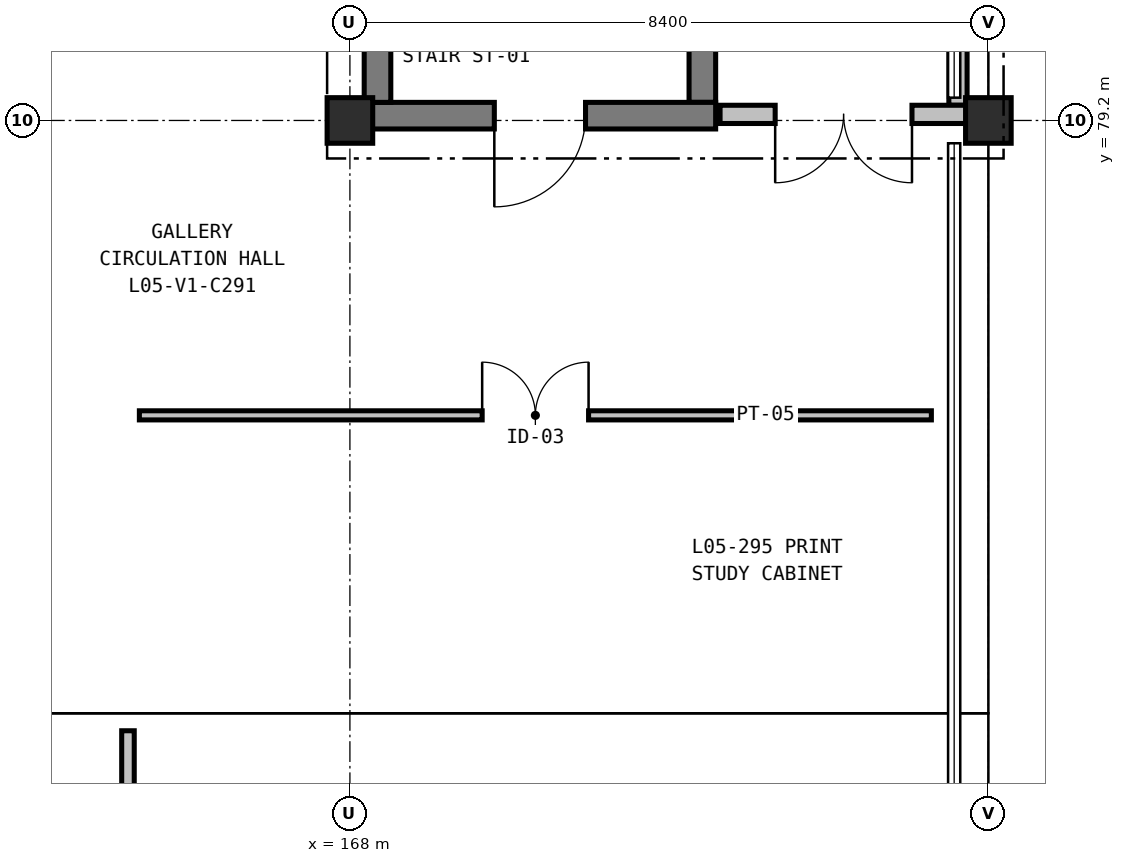
"""IFC4 building model, lengths in metres.
Left out: names, types, materials, properties, quantities, classifications, styles, units other than length and angle.
Written with IfcOpenShell. Run it as: python <this file> out.ifc"""

import sys

from ifc_helpers import new_model, si_unit, direction, frame, frame_2d, origin, origin_2d, place, context, subcontext, project, spatial, rectangle, extrude, element, fill, save


model = new_model("IFC4")
c1 = context("Model", 3, precision=1e-05, world=origin(), true_north=direction((0.0, 1.0)))
c2 = subcontext(c1, "Body", "Model", "MODEL_VIEW")
j1 = project(units=[si_unit("LENGTHUNIT", "METRE"), si_unit("PLANEANGLEUNIT", "RADIAN")], contexts=[c1])
p1 = place(None, origin())
s1 = spatial("IfcSite", under=j1, at=p1, CompositionType="ELEMENT")
p2 = place(p1, origin())
s2 = spatial("IfcBuilding", under=s1, at=p2, CompositionType="ELEMENT")
p3 = place(p2, frame((0.0, 0.0, 27.0)))
s3 = spatial("IfcBuildingStorey", under=s2, at=p3, CompositionType="ELEMENT", Elevation=27.0)
for number, where, z_axis, x_axis in (
    (1, (168.0, 79.2, 0.0), (0.0, 0.0, 1.0), (1.0, 0.0, 0.0)),
    (2, (176.4, 79.2, 0.0), (0.0, 0.0, 1.0), (1.0, 0.0, 0.0)),
):
    element("IfcColumn", number, at=place(p3, frame(where, z_axis=z_axis, x_axis=x_axis)), inside=s3, PredefinedType="COLUMN", context=c2, shape_type="SweptSolid", body=[
        extrude(rectangle(XDim=0.6, YDim=0.6, at=origin_2d()), origin(), (0.0, 0.0, 1.0), 5.4),
    ])
p4 = place(p3, frame((172.637, 88.562, 0.0), z_axis=(0.0, 0.0, 1.0), x_axis=(0.0, -1.0, 0.0)))
e3 = element("IfcWall", 3, at=p4, inside=s3, PredefinedType="SHEAR", context=c2, shape_type="SweptSolid", body=[
    extrude(rectangle(XDim=9.124, YDim=0.35, at=frame_2d((4.562, 0.0))), origin(), (0.0, 0.0, 1.0), 5.1),
])
p5 = place(p3, frame((172.812, 79.263, 0.0), z_axis=(0.0, 0.0, 1.0), x_axis=(-1.0, 0.0, 0.0)))
e4 = element("IfcWall", 4, at=p5, inside=s3, PredefinedType="SHEAR", context=c2, shape_type="SweptSolid", body=[
    extrude(rectangle(XDim=4.624, YDim=0.35, at=frame_2d((2.312, 0.0))), origin(), (0.0, 0.0, 1.0), 5.1),
])
p6 = place(p5, frame((1.712, 0.0, 0.0)))
e5 = element("IfcOpeningElement", 5, at=p6, cuts=e4, PredefinedType="OPENING", context=c2, shape_type="SweptSolid", body=[
    extrude(rectangle(XDim=1.2, YDim=2.2, at=frame_2d((0.6, 1.1))), frame((0.0, 0.185, 0.0), z_axis=(0.0, -1.0, 0.0), x_axis=(1.0, 0.0, 0.0)), (0.0, 0.0, 1.0), 0.37),
])
p7 = place(p3, frame((168.363, 79.438, 0.0), z_axis=(0.0, 0.0, 1.0), x_axis=(0.0, 1.0, 0.0)))
e6 = element("IfcWall", 6, at=p7, inside=s3, PredefinedType="SHEAR", context=c2, shape_type="SweptSolid", body=[
    extrude(rectangle(XDim=9.124, YDim=0.35, at=frame_2d((4.562, 0.0))), origin(), (0.0, 0.0, 1.0), 5.1),
])
p8 = place(p3, frame((176.0, 84.9, 0.0), z_axis=(0.0, 0.0, 1.0), x_axis=(0.0, -1.0, 0.0)))
e7 = element("IfcWall", 7, at=p8, inside=s3, PredefinedType="PARTITIONING", context=c2, shape_type="SweptSolid", body=[
    extrude(rectangle(XDim=5.5, YDim=0.24, at=frame_2d((2.75, 0.0))), origin(), (0.0, 0.0, 1.0), 4.465),
])
p9 = place(p3, frame((176.12, 79.28, 0.0), z_axis=(0.0, 0.0, 1.0), x_axis=(-1.0, 0.0, 0.0)))
e8 = element("IfcWall", 8, at=p9, inside=s3, PredefinedType="PARTITIONING", context=c2, shape_type="SweptSolid", body=[
    extrude(rectangle(XDim=3.25, YDim=0.24, at=frame_2d((1.625, 0.0))), origin(), (0.0, 0.0, 1.0), 4.465),
])
p10 = place(p9, frame((0.725, 0.0, 0.0)))
e9 = element("IfcOpeningElement", 9, at=p10, cuts=e8, PredefinedType="OPENING", context=c2, shape_type="SweptSolid", body=[
    extrude(rectangle(XDim=1.8, YDim=2.25, at=frame_2d((0.9, 1.125))), frame((0.0, 0.13, 0.0), z_axis=(0.0, -1.0, 0.0), x_axis=(1.0, 0.0, 0.0)), (0.0, 0.0, 1.0), 0.26),
])
p11 = place(p3, frame((165.08, 58.73, 0.0), z_axis=(0.0, 0.0, 1.0), x_axis=(0.0, 1.0, 0.0)))
e10 = element("IfcWall", 10, at=p11, inside=s3, PredefinedType="PARTITIONING", context=c2, shape_type="SweptSolid", body=[
    extrude(rectangle(XDim=12.44, YDim=0.165, at=frame_2d((6.22, 0.0))), origin(), (0.0, 0.0, 1.0), 4.465),
])
p12 = place(p11, frame((5.32, 0.0, 0.0)))
e11 = element("IfcOpeningElement", 11, at=p12, cuts=e10, PredefinedType="OPENING", context=c2, shape_type="SweptSolid", body=[
    extrude(rectangle(XDim=1.8, YDim=2.4, at=frame_2d((0.9, 1.2))), frame((0.0, 0.093, 0.0), z_axis=(0.0, -1.0, 0.0), x_axis=(1.0, 0.0, 0.0)), (0.0, 0.0, 1.0), 0.185),
])
p13 = place(p3, frame((165.23, 75.32, 0.0), z_axis=(0.0, 0.0, 1.0), x_axis=(1.0, 0.0, 0.0)))
e12 = element("IfcWall", 12, at=p13, inside=s3, PredefinedType="PARTITIONING", context=c2, shape_type="SweptSolid", body=[
    extrude(rectangle(XDim=10.42, YDim=0.12, at=frame_2d((5.21, 0.0))), origin(), (0.0, 0.0, 1.0), 4.315),
])
p14 = place(p13, frame((4.51, 0.0, 0.0)))
e13 = element("IfcOpeningElement", 13, at=p14, cuts=e12, PredefinedType="OPENING", context=c2, shape_type="SweptSolid", body=[
    extrude(rectangle(XDim=1.4, YDim=2.3, at=frame_2d((0.7, 1.15))), frame((0.0, 0.07, 0.0), z_axis=(0.0, -1.0, 0.0), x_axis=(1.0, 0.0, 0.0)), (0.0, 0.0, 1.0), 0.14),
])
p15 = place(p6, origin())
e14 = element("IfcDoor", 14, at=p15, inside=s3, OperationType="SINGLE_SWING_RIGHT", PredefinedType="DOOR", context=c2, shape_type="SweptSolid", body=[
    extrude(rectangle(XDim=1.2, YDim=2.2, at=frame_2d((0.6, 1.1))), frame((0.0, 0.025, 0.0), z_axis=(0.0, -1.0, 0.0), x_axis=(1.0, 0.0, 0.0)), (0.0, 0.0, 1.0), 0.05),
])
fill(e5, e14)
p16 = place(p10, origin())
e15 = element("IfcDoor", 15, at=p16, inside=s3, OperationType="DOUBLE_DOOR_SINGLE_SWING", PredefinedType="DOOR", context=c2, shape_type="SweptSolid", body=[
    extrude(rectangle(XDim=1.8, YDim=2.25, at=frame_2d((0.9, 1.125))), frame((0.0, 0.025, 0.0), z_axis=(0.0, -1.0, 0.0), x_axis=(1.0, 0.0, 0.0)), (0.0, 0.0, 1.0), 0.05),
])
fill(e9, e15)
p17 = place(p14, origin())
e16 = element("IfcDoor", 16, at=p17, inside=s3, OperationType="DOUBLE_DOOR_SINGLE_SWING", PredefinedType="DOOR", context=c2, shape_type="SweptSolid", body=[
    extrude(rectangle(XDim=1.4, YDim=2.3, at=frame_2d((0.7, 1.15))), frame((0.0, 0.025, 0.0), z_axis=(0.0, -1.0, 0.0), x_axis=(1.0, 0.0, 0.0)), (0.0, 0.0, 1.0), 0.05),
])
fill(e13, e16)
save(model, sys.argv[1])
